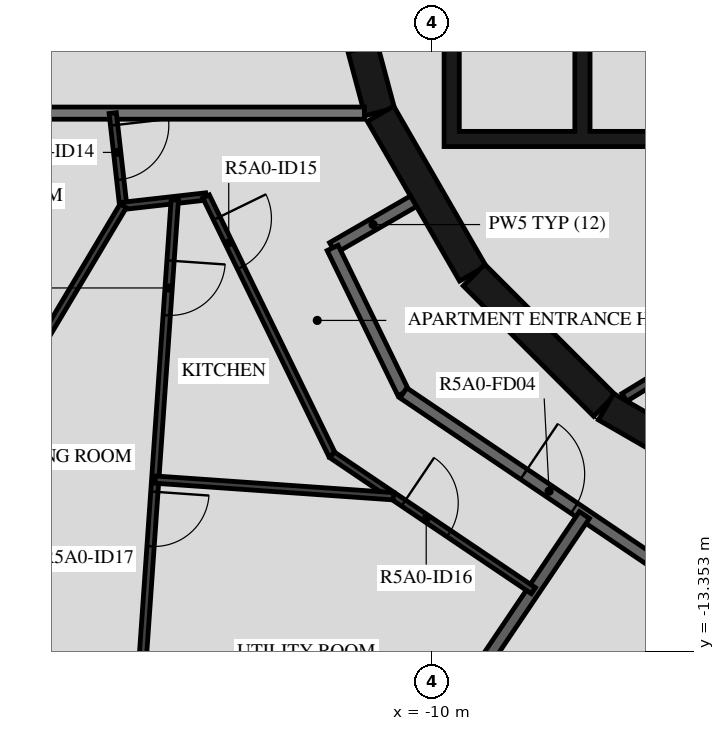
"""IFC4 building model, lengths in metres.
Left out: names, types, materials, properties, quantities, classifications, styles, units other than length and angle.
Written with IfcOpenShell. Run it as: python <this file> out.ifc"""

import sys

from ifc_helpers import new_model, si_unit, direction, frame, frame_2d, origin, place, context, subcontext, project, spatial, polyline, rectangle, outline, extrude, element, fill, save


model = new_model("IFC4")
c1 = context("Model", 3, precision=1e-05, world=origin(), true_north=direction((0.0, 1.0)))
c2 = subcontext(c1, "Body", "Model", "MODEL_VIEW")
j1 = project(units=[si_unit("LENGTHUNIT", "METRE"), si_unit("PLANEANGLEUNIT", "RADIAN")], contexts=[c1])
p1 = place(None, origin())
s1 = spatial("IfcSite", under=j1, at=p1, CompositionType="ELEMENT")
p2 = place(p1, origin())
s2 = spatial("IfcBuilding", under=s1, at=p2, CompositionType="ELEMENT")
p3 = place(p2, frame((0.0, 0.0, 188.4)))
s3 = spatial("IfcBuildingStorey", under=s2, at=p3, CompositionType="ELEMENT", Elevation=188.4)
p4 = place(p3, frame((-11.643, -1.55, 0.0), z_axis=(0.0, 0.0, 1.0), x_axis=(0.258734743916, -0.965948410781, 0.0)))
e1 = element("IfcWall", 1, at=p4, inside=s3, PredefinedType="SHEAR", context=c2, shape_type="SweptSolid", body=[
    extrude(rectangle(XDim=3.033, YDim=0.5, at=frame_2d((1.516, 0.0))), origin(), (0.0, 0.0, 1.0), 3.12),
])
p5 = place(p4, frame((1.066, 0.0, 0.0)))
e2 = element("IfcOpeningElement", 2, at=p5, cuts=e1, PredefinedType="OPENING", context=c2, shape_type="SweptSolid", body=[
    extrude(rectangle(XDim=0.9, YDim=2.1, at=frame_2d((0.45, 1.05))), frame((0.0, 0.26, 0.0), z_axis=(0.0, -1.0, 0.0), x_axis=(1.0, 0.0, 0.0)), (0.0, 0.0, 1.0), 0.52),
])
p6 = place(p3, frame((-10.845, -4.51, 0.0), z_axis=(0.0, 0.0, 1.0), x_axis=(0.500087131594, -0.865975092491, 0.0)))
e3 = element("IfcWall", 3, at=p6, inside=s3, PredefinedType="SHEAR", context=c2, shape_type="SweptSolid", body=[
    extrude(rectangle(XDim=3.033, YDim=0.5, at=frame_2d((1.516, 0.0))), origin(), (0.0, 0.0, 1.0), 3.12),
])
p7 = place(p3, frame((-9.308, -7.164, 0.0), z_axis=(0.0, 0.0, 1.0), x_axis=(0.707106781187, -0.707106781187, 0.0)))
e4 = element("IfcWall", 4, at=p7, inside=s3, PredefinedType="SHEAR", context=c2, shape_type="SweptSolid", body=[
    extrude(rectangle(XDim=3.032, YDim=0.5, at=frame_2d((1.516, 0.0))), origin(), (0.0, 0.0, 1.0), 3.12),
])
p8 = place(p3, frame((-7.137, -9.329, 0.0), z_axis=(0.0, 0.0, 1.0), x_axis=(0.865975092491, -0.500087131594, 0.0)))
e5 = element("IfcWall", 5, at=p8, inside=s3, PredefinedType="SHEAR", context=c2, shape_type="SweptSolid", body=[
    extrude(rectangle(XDim=3.033, YDim=0.5, at=frame_2d((1.516, 0.0))), origin(), (0.0, 0.0, 1.0), 3.12),
])
p9 = place(p3, origin())
e6 = element("IfcWall", 6, at=p9, inside=s3, PredefinedType="SHEAR", context=c2, shape_type="SweptSolid", body=[
    extrude(outline(polyline([(9.8, -5.05), (9.8, -4.8), (9.8, -1.9), (9.55, -1.9), (9.55, -4.8), (7.65, -4.8), (7.65, -1.9), (7.4, -1.9), (7.4, -4.8), (5.5, -4.8), (5.5, -1.9), (5.25, -1.9), (5.25, -4.8), (3.35, -4.8), (3.35, -1.9), (3.1, -1.9), (3.1, -4.8), (1.2, -4.8), (1.2, -1.9), (0.95, -1.9), (0.95, -4.8), (-0.95, -4.8), (-0.95, -1.9), (-1.2, -1.9), (-1.2, -4.8), (-3.1, -4.8), (-3.1, -1.9), (-3.35, -1.9), (-3.35, -4.8), (-5.25, -4.8), (-5.25, -1.9), (-5.5, -1.9), (-5.5, -4.8), (-7.4, -4.8), (-7.4, -1.9), (-7.65, -1.9), (-7.65, -4.8), (-9.55, -4.8), (-9.55, -1.9), (-9.8, -1.9), (-9.8, -4.8), (-9.8, -5.05), (9.8, -5.05)])), origin(), (0.0, 0.0, 1.0), 3.12),
])
p10 = place(p3, frame((-2.451, -6.495, 0.0), z_axis=(0.0, 0.0, 1.0), x_axis=(-0.853250115418, -0.521501908471, 0.0)))
e7 = element("IfcWall", 7, at=p10, inside=s3, PredefinedType="PARTITIONING", context=c2, shape_type="SweptSolid", body=[
    extrude(rectangle(XDim=5.137, YDim=0.15, at=frame_2d((2.569, 0.0))), origin(), (0.0, 0.0, 1.0), 3.12),
])
p11 = place(p10, frame((2.119, 0.0, 0.0)))
e8 = element("IfcOpeningElement", 8, at=p11, cuts=e7, PredefinedType="OPENING", context=c2, shape_type="SweptSolid", body=[
    extrude(rectangle(XDim=0.9, YDim=2.1, at=frame_2d((0.45, 1.05))), frame((0.0, 0.085, 0.0), z_axis=(0.0, -1.0, 0.0), x_axis=(1.0, 0.0, 0.0)), (0.0, 0.0, 1.0), 0.17),
])
p12 = place(p3, frame((-10.303, -5.949, 0.0), z_axis=(0.0, 0.0, 1.0), x_axis=(-0.866042588199, -0.499970234539, 0.0)))
e9 = element("IfcWall", 9, at=p12, inside=s3, PredefinedType="STANDARD", context=c2, shape_type="SweptSolid", body=[
    extrude(rectangle(XDim=1.535, YDim=0.2, at=frame_2d((0.768, 0.0))), origin(), (0.0, 0.0, 1.0), 3.12),
])
p13 = place(p3, frame((-11.633, -6.716, 0.0), z_axis=(0.0, 0.0, 1.0), x_axis=(0.438322116278, -0.898817958422, 0.0)))
e10 = element("IfcWall", 10, at=p13, inside=s3, PredefinedType="STANDARD", context=c2, shape_type="SweptSolid", body=[
    extrude(rectangle(XDim=2.654, YDim=0.2, at=frame_2d((1.327, 0.0))), origin(), (0.0, 0.0, 1.0), 3.12),
])
p14 = place(p3, frame((-10.47, -9.101, 0.0), z_axis=(0.0, 0.0, 1.0), x_axis=(0.829035841718, -0.559195469534, 0.0)))
e11 = element("IfcWall", 11, at=p14, inside=s3, PredefinedType="STANDARD", context=c2, shape_type="SweptSolid", body=[
    extrude(rectangle(XDim=7.181, YDim=0.2, at=frame_2d((3.591, 0.0))), origin(), (0.0, 0.0, 1.0), 3.12),
])
p15 = place(p14, frame((2.39, 0.0, 0.0)))
e12 = element("IfcOpeningElement", 12, at=p15, cuts=e11, PredefinedType="OPENING", context=c2, shape_type="SweptSolid", body=[
    extrude(rectangle(XDim=1.0, YDim=2.1, at=frame_2d((0.5, 1.05))), frame((0.0, 0.11, 0.0), z_axis=(0.0, -1.0, 0.0), x_axis=(1.0, 0.0, 0.0)), (0.0, 0.0, 1.0), 0.22),
])
p16 = place(p3, frame((-17.9, -4.5, 0.0), z_axis=(0.0, 0.0, 1.0), x_axis=(1.0, 0.0, 0.0)))
e13 = element("IfcWall", 13, at=p16, inside=s3, PredefinedType="STANDARD", context=c2, shape_type="SweptSolid", body=[
    extrude(rectangle(XDim=6.789, YDim=0.2, at=frame_2d((3.394, 0.0))), origin(), (0.0, 0.0, 1.0), 3.12),
])
p17 = place(p3, frame((-10.407, -15.43, 0.0), z_axis=(0.0, 0.0, 1.0), x_axis=(0.559038328133, 0.829141813973, 0.0)))
e14 = element("IfcWall", 14, at=p17, inside=s3, PredefinedType="STANDARD", context=c2, shape_type="SweptSolid", body=[
    extrude(rectangle(XDim=5.212, YDim=0.2, at=frame_2d((2.606, 0.0))), origin(), (0.0, 0.0, 1.0), 3.12),
])
p18 = place(p3, frame((-15.25, -4.5, 0.0), z_axis=(0.0, 0.0, 1.0), x_axis=(0.1124919794, -0.99365263275, 0.0)))
e15 = element("IfcWall", 15, at=p18, inside=s3, PredefinedType="PARTITIONING", context=c2, shape_type="SweptSolid", body=[
    extrude(rectangle(XDim=1.534, YDim=0.12, at=frame_2d((0.767, 0.0))), origin(), (0.0, 0.0, 1.0), 3.12),
])
p19 = place(p18, frame((0.2, 0.0, 0.0)))
e16 = element("IfcOpeningElement", 16, at=p19, cuts=e15, PredefinedType="OPENING", context=c2, shape_type="SweptSolid", body=[
    extrude(rectangle(XDim=0.9, YDim=2.1, at=frame_2d((0.45, 1.05))), frame((0.0, 0.07, 0.0), z_axis=(0.0, -1.0, 0.0), x_axis=(1.0, 0.0, 0.0)), (0.0, 0.0, 1.0), 0.14),
])
p20 = place(p3, frame((-15.077, -6.025, 0.0), z_axis=(0.0, 0.0, 1.0), x_axis=(0.993646958109, 0.112542092746, 0.0)))
e17 = element("IfcWall", 17, at=p20, inside=s3, PredefinedType="PARTITIONING", context=c2, shape_type="SweptSolid", body=[
    extrude(rectangle(XDim=1.371, YDim=0.12, at=frame_2d((0.686, 0.0))), origin(), (0.0, 0.0, 1.0), 3.12),
])
p21 = place(p3, frame((-13.715, -5.87, 0.0), z_axis=(0.0, 0.0, 1.0), x_axis=(0.438372766482, -0.89879325632, 0.0)))
e18 = element("IfcWall", 18, at=p21, inside=s3, PredefinedType="PARTITIONING", context=c2, shape_type="SweptSolid", body=[
    extrude(rectangle(XDim=4.728, YDim=0.12, at=frame_2d((2.364, 0.0))), origin(), (0.0, 0.0, 1.0), 3.12),
])
p22 = place(p21, frame((0.4, 0.0, 0.0)))
e19 = element("IfcOpeningElement", 19, at=p22, cuts=e18, PredefinedType="OPENING", context=c2, shape_type="SweptSolid", body=[
    extrude(rectangle(XDim=0.9, YDim=2.1, at=frame_2d((0.45, 1.05))), frame((0.0, 0.07, 0.0), z_axis=(0.0, -1.0, 0.0), x_axis=(1.0, 0.0, 0.0)), (0.0, 0.0, 1.0), 0.14),
])
p23 = place(p3, frame((-11.642, -10.12, 0.0), z_axis=(0.0, 0.0, 1.0), x_axis=(0.829018066952, -0.559221820629, 0.0)))
e20 = element("IfcWall", 20, at=p23, inside=s3, PredefinedType="PARTITIONING", context=c2, shape_type="SweptSolid", body=[
    extrude(rectangle(XDim=3.992, YDim=0.12, at=frame_2d((1.996, 0.0))), origin(), (0.0, 0.0, 1.0), 3.12),
])
p24 = place(p23, frame((1.417, 0.0, 0.0)))
e21 = element("IfcOpeningElement", 21, at=p24, cuts=e20, PredefinedType="OPENING", context=c2, shape_type="SweptSolid", body=[
    extrude(rectangle(XDim=0.9, YDim=2.1, at=frame_2d((0.45, 1.05))), frame((0.0, 0.07, 0.0), z_axis=(0.0, -1.0, 0.0), x_axis=(1.0, 0.0, 0.0)), (0.0, 0.0, 1.0), 0.14),
])
p25 = place(p3, frame((-19.156, -12.863, 0.0), z_axis=(0.0, 0.0, 1.0), x_axis=(0.512316386407, 0.858796786335, 0.0)))
e22 = element("IfcWall", 22, at=p25, inside=s3, PredefinedType="PARTITIONING", context=c2, shape_type="SweptSolid", body=[
    extrude(rectangle(XDim=7.963, YDim=0.12, at=frame_2d((3.981, 0.0))), origin(), (0.0, 0.0, 1.0), 3.12),
])
p26 = place(p3, frame((-14.229, -5.929, 0.0), z_axis=(0.0, 0.0, 1.0), x_axis=(-0.069740723375, -0.997565151508, 0.0)))
e23 = element("IfcWall", 23, at=p26, inside=s3, PredefinedType="PARTITIONING", context=c2, shape_type="SweptSolid", body=[
    extrude(rectangle(XDim=10.47, YDim=0.12, at=frame_2d((5.235, 0.0))), origin(), (0.0, 0.0, 1.0), 3.12),
])
p27 = place(p26, frame((4.809, 0.0, 0.0)))
e24 = element("IfcOpeningElement", 24, at=p27, cuts=e23, PredefinedType="OPENING", context=c2, shape_type="SweptSolid", body=[
    extrude(rectangle(XDim=0.9, YDim=2.1, at=frame_2d((0.45, 1.05))), frame((0.0, 0.07, 0.0), z_axis=(0.0, -1.0, 0.0), x_axis=(1.0, 0.0, 0.0)), (0.0, 0.0, 1.0), 0.14),
])
p28 = place(p26, frame((1.0, 0.0, 0.0)))
e25 = element("IfcOpeningElement", 25, at=p28, cuts=e23, PredefinedType="OPENING", context=c2, shape_type="SweptSolid", body=[
    extrude(rectangle(XDim=0.9, YDim=2.1, at=frame_2d((0.45, 1.05))), frame((0.0, 0.07, 0.0), z_axis=(0.0, -1.0, 0.0), x_axis=(1.0, 0.0, 0.0)), (0.0, 0.0, 1.0), 0.14),
])
p29 = place(p3, frame((-14.551, -10.527, 0.0), z_axis=(0.0, 0.0, 1.0), x_axis=(0.997564247633, -0.069753651118, 0.0)))
e26 = element("IfcWall", 26, at=p29, inside=s3, PredefinedType="PARTITIONING", context=c2, shape_type="SweptSolid", body=[
    extrude(rectangle(XDim=3.927, YDim=0.12, at=frame_2d((1.963, 0.0))), origin(), (0.0, 0.0, 1.0), 3.12),
])
p30 = place(p15, origin())
e27 = element("IfcDoor", 27, at=p30, inside=s3, OperationType="SINGLE_SWING_RIGHT", PredefinedType="DOOR", context=c2, shape_type="SweptSolid", body=[
    extrude(rectangle(XDim=1.0, YDim=2.1, at=frame_2d((0.5, 1.05))), frame((0.0, 0.025, 0.0), z_axis=(0.0, -1.0, 0.0), x_axis=(1.0, 0.0, 0.0)), (0.0, 0.0, 1.0), 0.05),
])
fill(e12, e27)
p31 = place(p19, origin())
e28 = element("IfcDoor", 28, at=p31, inside=s3, OperationType="SINGLE_SWING_RIGHT", PredefinedType="DOOR", context=c2, shape_type="SweptSolid", body=[
    extrude(rectangle(XDim=0.9, YDim=2.1, at=frame_2d((0.45, 1.05))), frame((0.0, 0.025, 0.0), z_axis=(0.0, -1.0, 0.0), x_axis=(1.0, 0.0, 0.0)), (0.0, 0.0, 1.0), 0.05),
])
fill(e16, e28)
p32 = place(p22, origin())
e29 = element("IfcDoor", 29, at=p32, inside=s3, OperationType="SINGLE_SWING_RIGHT", PredefinedType="DOOR", context=c2, shape_type="SweptSolid", body=[
    extrude(rectangle(XDim=0.9, YDim=2.1, at=frame_2d((0.45, 1.05))), frame((0.0, 0.025, 0.0), z_axis=(0.0, -1.0, 0.0), x_axis=(1.0, 0.0, 0.0)), (0.0, 0.0, 1.0), 0.05),
])
fill(e19, e29)
p33 = place(p24, origin())
e30 = element("IfcDoor", 30, at=p33, inside=s3, OperationType="SINGLE_SWING_RIGHT", PredefinedType="DOOR", context=c2, shape_type="SweptSolid", body=[
    extrude(rectangle(XDim=0.9, YDim=2.1, at=frame_2d((0.45, 1.05))), frame((0.0, 0.025, 0.0), z_axis=(0.0, -1.0, 0.0), x_axis=(1.0, 0.0, 0.0)), (0.0, 0.0, 1.0), 0.05),
])
fill(e21, e30)
p34 = place(p27, origin())
e31 = element("IfcDoor", 31, at=p34, inside=s3, OperationType="SINGLE_SWING_RIGHT", PredefinedType="DOOR", context=c2, shape_type="SweptSolid", body=[
    extrude(rectangle(XDim=0.9, YDim=2.1, at=frame_2d((0.45, 1.05))), frame((0.0, 0.025, 0.0), z_axis=(0.0, -1.0, 0.0), x_axis=(1.0, 0.0, 0.0)), (0.0, 0.0, 1.0), 0.05),
])
fill(e24, e31)
p35 = place(p28, origin())
e32 = element("IfcDoor", 32, at=p35, inside=s3, OperationType="SINGLE_SWING_LEFT", PredefinedType="DOOR", context=c2, shape_type="SweptSolid", body=[
    extrude(rectangle(XDim=0.9, YDim=2.1, at=frame_2d((0.45, 1.05))), frame((0.0, 0.025, 0.0), z_axis=(0.0, -1.0, 0.0), x_axis=(1.0, 0.0, 0.0)), (0.0, 0.0, 1.0), 0.05),
])
fill(e25, e32)
save(model, sys.argv[1])
